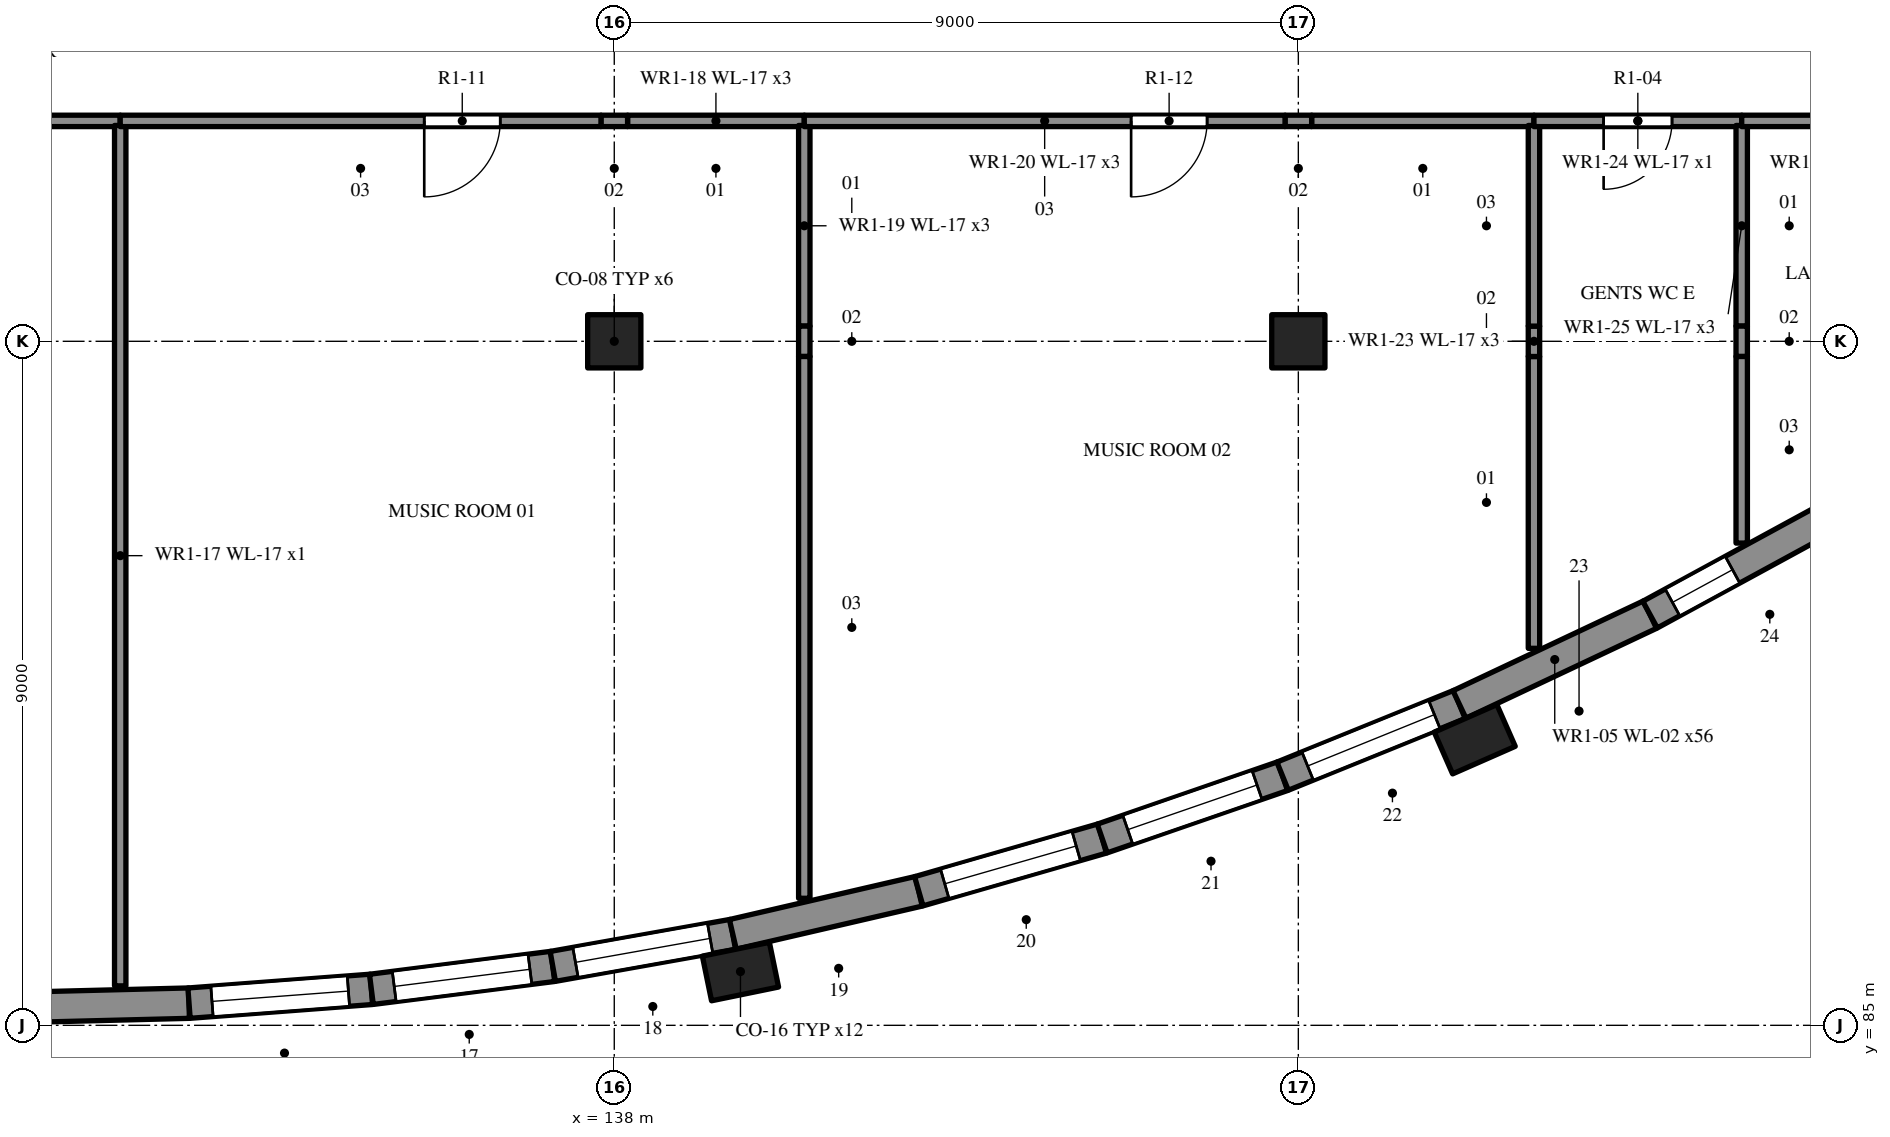
"""IFC4 building model, lengths in metres.
Left out: names, types, materials, properties, quantities, classifications, styles, units other than length and angle.
Written with IfcOpenShell. Run it as: python <this file> out.ifc"""

import sys

from ifc_helpers import new_model, si_unit, direction, frame, frame_2d, origin, origin_2d, place, context, subcontext, project, spatial, rectangle, extrude, element, fill, save


model = new_model("IFC4")
c1 = context("Model", 3, precision=1e-05, world=origin(), true_north=direction((0.0, 1.0)))
c2 = subcontext(c1, "Body", "Model", "MODEL_VIEW")
j1 = project(units=[si_unit("LENGTHUNIT", "METRE"), si_unit("PLANEANGLEUNIT", "RADIAN")], contexts=[c1])
p1 = place(None, origin())
s1 = spatial("IfcSite", under=j1, at=p1, CompositionType="ELEMENT")
p2 = place(p1, origin())
s2 = spatial("IfcBuilding", under=s1, at=p2, CompositionType="ELEMENT")
p3 = place(p2, frame((0.0, 0.0, 5.4)))
s3 = spatial("IfcBuildingStorey", under=s2, at=p3, CompositionType="ELEMENT", Elevation=5.4)
for number, where, z_axis, x_axis in (
    (1, (138.0, 94.0, 0.0), (0.0, 0.0, 1.0), (1.0, 0.0, 0.0)),
    (2, (147.0, 94.0, 0.0), (0.0, 0.0, 1.0), (1.0, 0.0, 0.0)),
):
    element("IfcColumn", number, at=place(p3, frame(where, z_axis=z_axis, x_axis=x_axis)), inside=s3, PredefinedType="COLUMN", context=c2, shape_type="SweptSolid", body=[
        extrude(rectangle(XDim=0.7, YDim=0.7, at=origin_2d()), origin(), (0.0, 0.0, 1.0), 4.52),
    ])
p4 = place(p3, frame((130.0, 85.231, 0.0), z_axis=(0.0, 0.0, 1.0), x_axis=(0.999683321759, 0.025164582196, 0.0)))
e3 = element("IfcWall", 3, at=p4, inside=s3, PredefinedType="SOLIDWALL", context=c2, shape_type="SweptSolid", body=[
    extrude(rectangle(XDim=2.406, YDim=0.4, at=frame_2d((1.203, 0.0))), origin(), (0.0, 0.0, 1.0), 4.8),
])
p5 = place(p3, frame((132.405, 85.292, 0.0), z_axis=(0.0, 0.0, 1.0), x_axis=(0.997146276918, 0.075493724435, 0.0)))
e4 = element("IfcWall", 4, at=p5, inside=s3, PredefinedType="SOLIDWALL", context=c2, shape_type="SweptSolid", body=[
    extrude(rectangle(XDim=2.406, YDim=0.4, at=frame_2d((1.203, 0.0))), origin(), (0.0, 0.0, 1.0), 4.8),
])
p6 = place(p5, frame((0.303, 0.0, 1.0)))
e5 = element("IfcOpeningElement", 5, at=p6, cuts=e4, PredefinedType="OPENING", context=c2, shape_type="SweptSolid", body=[
    extrude(rectangle(XDim=1.8, YDim=2.1, at=frame_2d((0.9, 1.05))), frame((0.0, 0.21, 0.0), z_axis=(0.0, -1.0, 0.0), x_axis=(1.0, 0.0, 0.0)), (0.0, 0.0, 1.0), 0.42),
])
p7 = place(p3, frame((134.804, 85.473, 0.0), z_axis=(0.0, 0.0, 1.0), x_axis=(0.99208939311, 0.125533406227, 0.0)))
e6 = element("IfcWall", 6, at=p7, inside=s3, PredefinedType="SOLIDWALL", context=c2, shape_type="SweptSolid", body=[
    extrude(rectangle(XDim=2.406, YDim=0.4, at=frame_2d((1.203, 0.0))), origin(), (0.0, 0.0, 1.0), 4.8),
])
p8 = place(p7, frame((0.303, 0.0, 1.0)))
e7 = element("IfcOpeningElement", 7, at=p8, cuts=e6, PredefinedType="OPENING", context=c2, shape_type="SweptSolid", body=[
    extrude(rectangle(XDim=1.8, YDim=2.1, at=frame_2d((0.9, 1.05))), frame((0.0, 0.21, 0.0), z_axis=(0.0, -1.0, 0.0), x_axis=(1.0, 0.0, 0.0)), (0.0, 0.0, 1.0), 0.42),
])
p9 = place(p3, frame((137.191, 85.775, 0.0), z_axis=(0.0, 0.0, 1.0), x_axis=(0.984524011381, 0.175249738987, 0.0)))
e8 = element("IfcWall", 8, at=p9, inside=s3, PredefinedType="SOLIDWALL", context=c2, shape_type="SweptSolid", body=[
    extrude(rectangle(XDim=2.406, YDim=0.4, at=frame_2d((1.203, 0.0))), origin(), (0.0, 0.0, 1.0), 4.8),
])
p10 = place(p9, frame((0.303, 0.0, 1.0)))
e9 = element("IfcOpeningElement", 9, at=p10, cuts=e8, PredefinedType="OPENING", context=c2, shape_type="SweptSolid", body=[
    extrude(rectangle(XDim=1.8, YDim=2.1, at=frame_2d((0.9, 1.05))), frame((0.0, 0.21, 0.0), z_axis=(0.0, -1.0, 0.0), x_axis=(1.0, 0.0, 0.0)), (0.0, 0.0, 1.0), 0.42),
])
p11 = place(p3, frame((139.56, 86.197, 0.0), z_axis=(0.0, 0.0, 1.0), x_axis=(0.974210649093, 0.225640446716, 0.0)))
e10 = element("IfcWall", 10, at=p11, inside=s3, PredefinedType="SOLIDWALL", context=c2, shape_type="SweptSolid", body=[
    extrude(rectangle(XDim=2.511, YDim=0.4, at=frame_2d((1.256, 0.0))), origin(), (0.0, 0.0, 1.0), 4.8),
])
p12 = place(p3, frame((142.006, 86.764, 0.0), z_axis=(0.0, 0.0, 1.0), x_axis=(0.961008605775, 0.276518461637, 0.0)))
e11 = element("IfcWall", 11, at=p12, inside=s3, PredefinedType="SOLIDWALL", context=c2, shape_type="SweptSolid", body=[
    extrude(rectangle(XDim=2.511, YDim=0.4, at=frame_2d((1.255, 0.0))), origin(), (0.0, 0.0, 1.0), 4.8),
])
p13 = place(p12, frame((0.355, 0.0, 1.0)))
e12 = element("IfcOpeningElement", 12, at=p13, cuts=e11, PredefinedType="OPENING", context=c2, shape_type="SweptSolid", body=[
    extrude(rectangle(XDim=1.8, YDim=2.1, at=frame_2d((0.9, 1.05))), frame((0.0, 0.21, 0.0), z_axis=(0.0, -1.0, 0.0), x_axis=(1.0, 0.0, 0.0)), (0.0, 0.0, 1.0), 0.42),
])
p14 = place(p3, frame((144.419, 87.458, 0.0), z_axis=(0.0, 0.0, 1.0), x_axis=(0.94514546406, 0.326649738659, 0.0)))
e13 = element("IfcWall", 13, at=p14, inside=s3, PredefinedType="SOLIDWALL", context=c2, shape_type="SweptSolid", body=[
    extrude(rectangle(XDim=2.511, YDim=0.4, at=frame_2d((1.256, 0.0))), origin(), (0.0, 0.0, 1.0), 4.8),
])
p15 = place(p14, frame((0.355, 0.0, 1.0)))
e14 = element("IfcOpeningElement", 14, at=p15, cuts=e13, PredefinedType="OPENING", context=c2, shape_type="SweptSolid", body=[
    extrude(rectangle(XDim=1.8, YDim=2.1, at=frame_2d((0.9, 1.05))), frame((0.0, 0.21, 0.0), z_axis=(0.0, -1.0, 0.0), x_axis=(1.0, 0.0, 0.0)), (0.0, 0.0, 1.0), 0.42),
])
p16 = place(p3, frame((146.793, 88.278, 0.0), z_axis=(0.0, 0.0, 1.0), x_axis=(0.926722795862, 0.375745738007, 0.0)))
e15 = element("IfcWall", 15, at=p16, inside=s3, PredefinedType="SOLIDWALL", context=c2, shape_type="SweptSolid", body=[
    extrude(rectangle(XDim=2.511, YDim=0.4, at=frame_2d((1.255, 0.0))), origin(), (0.0, 0.0, 1.0), 4.8),
])
p17 = place(p16, frame((0.355, 0.0, 1.0)))
e16 = element("IfcOpeningElement", 16, at=p17, cuts=e15, PredefinedType="OPENING", context=c2, shape_type="SweptSolid", body=[
    extrude(rectangle(XDim=1.8, YDim=2.1, at=frame_2d((0.9, 1.05))), frame((0.0, 0.21, 0.0), z_axis=(0.0, -1.0, 0.0), x_axis=(1.0, 0.0, 0.0)), (0.0, 0.0, 1.0), 0.42),
])
p18 = place(p3, frame((149.12, 89.222, 0.0), z_axis=(0.0, 0.0, 1.0), x_axis=(0.904527098751, 0.42641614372, 0.0)))
e17 = element("IfcWall", 17, at=p18, inside=s3, PredefinedType="SOLIDWALL", context=c2, shape_type="SweptSolid", body=[
    extrude(rectangle(XDim=2.772, YDim=0.4, at=frame_2d((1.386, 0.0))), origin(), (0.0, 0.0, 1.0), 4.8),
])
p19 = place(p3, frame((151.627, 90.404, 0.0), z_axis=(0.0, 0.0, 1.0), x_axis=(0.878292493566, 0.478123724308, 0.0)))
e18 = element("IfcWall", 18, at=p19, inside=s3, PredefinedType="SOLIDWALL", context=c2, shape_type="SweptSolid", body=[
    extrude(rectangle(XDim=2.772, YDim=0.4, at=frame_2d((1.386, 0.0))), origin(), (0.0, 0.0, 1.0), 4.8),
])
p20 = place(p19, frame((0.336, 0.0, 1.6)))
e19 = element("IfcOpeningElement", 19, at=p20, cuts=e18, PredefinedType="OPENING", context=c2, shape_type="SweptSolid", body=[
    extrude(rectangle(XDim=0.9, YDim=0.6, at=frame_2d((0.45, 0.3))), frame((0.0, 0.21, 0.0), z_axis=(0.0, -1.0, 0.0), x_axis=(1.0, 0.0, 0.0)), (0.0, 0.0, 1.0), 0.42),
])
for number, where, z_axis, x_axis in (
    (20, (139.66, 85.707, 0.0), (0.0, 0.0, 1.0), (0.98, 0.201, 0.0)),
    (21, (149.321, 88.764, 0.0), (0.0, 0.0, 1.0), (0.915, 0.403, 0.0)),
):
    element("IfcColumn", number, at=place(p3, frame(where, z_axis=z_axis, x_axis=x_axis)), inside=s3, PredefinedType="PILASTER", context=c2, shape_type="SweptSolid", body=[
        extrude(rectangle(XDim=0.9, YDim=0.6, at=origin_2d()), origin(), (0.0, 0.0, 1.0), 4.8),
    ])
p21 = place(p3, frame((131.5, 96.9, 0.0), z_axis=(0.0, 0.0, 1.0), x_axis=(-1.0, 0.0, 0.0)))
e22 = element("IfcWall", 22, at=p21, inside=s3, PredefinedType="PARTITIONING", context=c2, shape_type="SweptSolid", body=[
    extrude(rectangle(XDim=21.6, YDim=0.15, at=frame_2d((10.8, 0.0))), origin(), (0.0, 0.0, 1.0), 4.52),
])
p22 = place(p21, frame((15.3, 0.0, 0.0)))
e23 = element("IfcOpeningElement", 23, at=p22, cuts=e22, PredefinedType="OPENING", context=c2, shape_type="SweptSolid", body=[
    extrude(rectangle(XDim=1.8, YDim=2.1, at=frame_2d((0.9, 1.05))), frame((0.0, 0.085, 0.0), z_axis=(0.0, -1.0, 0.0), x_axis=(1.0, 0.0, 0.0)), (0.0, 0.0, 1.0), 0.17),
])
p23 = place(p21, frame((4.5, 0.0, 0.0)))
e24 = element("IfcOpeningElement", 24, at=p23, cuts=e22, PredefinedType="OPENING", context=c2, shape_type="SweptSolid", body=[
    extrude(rectangle(XDim=1.8, YDim=2.1, at=frame_2d((0.9, 1.05))), frame((0.0, 0.085, 0.0), z_axis=(0.0, -1.0, 0.0), x_axis=(1.0, 0.0, 0.0)), (0.0, 0.0, 1.0), 0.17),
])
p24 = place(p3, frame((131.5, 96.84, 0.0), z_axis=(0.0, 0.0, 1.0), x_axis=(0.0, -1.0, 0.0)))
e25 = element("IfcWall", 25, at=p24, inside=s3, PredefinedType="PARTITIONING", context=c2, shape_type="SweptSolid", body=[
    extrude(rectangle(XDim=11.321, YDim=0.15, at=frame_2d((5.661, 0.0))), origin(), (0.0, 0.0, 1.0), 4.52),
])
p25 = place(p3, frame((140.5, 96.9, 0.0), z_axis=(0.0, 0.0, 1.0), x_axis=(-1.0, 0.0, 0.0)))
e26 = element("IfcWall", 26, at=p25, inside=s3, PredefinedType="PARTITIONING", context=c2, shape_type="SweptSolid", body=[
    extrude(rectangle(XDim=2.325, YDim=0.15, at=frame_2d((1.163, 0.0))), origin(), (0.0, 0.0, 1.0), 4.52),
])
p26 = place(p3, frame((138.175, 96.9, 0.0), z_axis=(0.0, 0.0, 1.0), x_axis=(-1.0, 0.0, 0.0)))
e27 = element("IfcWall", 27, at=p26, inside=s3, PredefinedType="PARTITIONING", context=c2, shape_type="SweptSolid", body=[
    extrude(rectangle(XDim=0.35, YDim=0.15, at=frame_2d((0.175, 0.0))), origin(), (0.0, 0.0, 1.0), 3.82),
])
p27 = place(p3, frame((137.825, 96.9, 0.0), z_axis=(0.0, 0.0, 1.0), x_axis=(-1.0, 0.0, 0.0)))
e28 = element("IfcWall", 28, at=p27, inside=s3, PredefinedType="PARTITIONING", context=c2, shape_type="SweptSolid", body=[
    extrude(rectangle(XDim=6.325, YDim=0.15, at=frame_2d((3.163, 0.0))), origin(), (0.0, 0.0, 1.0), 4.52),
])
p28 = place(p27, frame((1.325, 0.0, 0.0)))
e29 = element("IfcOpeningElement", 29, at=p28, cuts=e28, PredefinedType="OPENING", context=c2, shape_type="SweptSolid", body=[
    extrude(rectangle(XDim=1.0, YDim=2.1, at=frame_2d((0.5, 1.05))), frame((0.0, 0.085, 0.0), z_axis=(0.0, -1.0, 0.0), x_axis=(1.0, 0.0, 0.0)), (0.0, 0.0, 1.0), 0.17),
])
p29 = place(p3, frame((140.5, 96.84, 0.0), z_axis=(0.0, 0.0, 1.0), x_axis=(0.0, -1.0, 0.0)))
e30 = element("IfcWall", 30, at=p29, inside=s3, PredefinedType="PARTITIONING", context=c2, shape_type="SweptSolid", body=[
    extrude(rectangle(XDim=2.64, YDim=0.15, at=frame_2d((1.32, 0.0))), origin(), (0.0, 0.0, 1.0), 4.52),
])
p30 = place(p3, frame((140.5, 94.2, 0.0), z_axis=(0.0, 0.0, 1.0), x_axis=(0.0, -1.0, 0.0)))
e31 = element("IfcWall", 31, at=p30, inside=s3, PredefinedType="PARTITIONING", context=c2, shape_type="SweptSolid", body=[
    extrude(rectangle(XDim=0.4, YDim=0.15, at=frame_2d((0.2, 0.0))), origin(), (0.0, 0.0, 1.0), 3.72),
])
p31 = place(p3, frame((140.5, 93.8, 0.0), z_axis=(0.0, 0.0, 1.0), x_axis=(0.0, -1.0, 0.0)))
e32 = element("IfcWall", 32, at=p31, inside=s3, PredefinedType="PARTITIONING", context=c2, shape_type="SweptSolid", body=[
    extrude(rectangle(XDim=7.129, YDim=0.15, at=frame_2d((3.564, 0.0))), origin(), (0.0, 0.0, 1.0), 4.52),
])
p32 = place(p3, frame((150.1, 96.9, 0.0), z_axis=(0.0, 0.0, 1.0), x_axis=(-1.0, 0.0, 0.0)))
e33 = element("IfcWall", 33, at=p32, inside=s3, PredefinedType="PARTITIONING", context=c2, shape_type="SweptSolid", body=[
    extrude(rectangle(XDim=2.925, YDim=0.15, at=frame_2d((1.462, 0.0))), origin(), (0.0, 0.0, 1.0), 4.52),
])
p33 = place(p3, frame((147.175, 96.9, 0.0), z_axis=(0.0, 0.0, 1.0), x_axis=(-1.0, 0.0, 0.0)))
e34 = element("IfcWall", 34, at=p33, inside=s3, PredefinedType="PARTITIONING", context=c2, shape_type="SweptSolid", body=[
    extrude(rectangle(XDim=0.35, YDim=0.15, at=frame_2d((0.175, 0.0))), origin(), (0.0, 0.0, 1.0), 3.82),
])
p34 = place(p3, frame((146.825, 96.9, 0.0), z_axis=(0.0, 0.0, 1.0), x_axis=(-1.0, 0.0, 0.0)))
e35 = element("IfcWall", 35, at=p34, inside=s3, PredefinedType="PARTITIONING", context=c2, shape_type="SweptSolid", body=[
    extrude(rectangle(XDim=6.325, YDim=0.15, at=frame_2d((3.163, 0.0))), origin(), (0.0, 0.0, 1.0), 4.52),
])
p35 = place(p34, frame((1.025, 0.0, 0.0)))
e36 = element("IfcOpeningElement", 36, at=p35, cuts=e35, PredefinedType="OPENING", context=c2, shape_type="SweptSolid", body=[
    extrude(rectangle(XDim=1.0, YDim=2.1, at=frame_2d((0.5, 1.05))), frame((0.0, 0.085, 0.0), z_axis=(0.0, -1.0, 0.0), x_axis=(1.0, 0.0, 0.0)), (0.0, 0.0, 1.0), 0.17),
])
p36 = place(p3, frame((150.1, 89.96, 0.0), z_axis=(0.0, 0.0, 1.0), x_axis=(0.0, 1.0, 0.0)))
e37 = element("IfcWall", 37, at=p36, inside=s3, PredefinedType="PARTITIONING", context=c2, shape_type="SweptSolid", body=[
    extrude(rectangle(XDim=3.84, YDim=0.15, at=frame_2d((1.92, 0.0))), origin(), (0.0, 0.0, 1.0), 4.52),
])
p37 = place(p3, frame((150.1, 93.8, 0.0), z_axis=(0.0, 0.0, 1.0), x_axis=(0.0, 1.0, 0.0)))
e38 = element("IfcWall", 38, at=p37, inside=s3, PredefinedType="PARTITIONING", context=c2, shape_type="SweptSolid", body=[
    extrude(rectangle(XDim=0.4, YDim=0.15, at=frame_2d((0.2, 0.0))), origin(), (0.0, 0.0, 1.0), 3.72),
])
p38 = place(p3, frame((150.1, 94.2, 0.0), z_axis=(0.0, 0.0, 1.0), x_axis=(0.0, 1.0, 0.0)))
e39 = element("IfcWall", 39, at=p38, inside=s3, PredefinedType="PARTITIONING", context=c2, shape_type="SweptSolid", body=[
    extrude(rectangle(XDim=2.64, YDim=0.15, at=frame_2d((1.32, 0.0))), origin(), (0.0, 0.0, 1.0), 4.52),
])
p39 = place(p3, frame((152.833, 96.9, 0.0), z_axis=(0.0, 0.0, 1.0), x_axis=(-1.0, 0.0, 0.0)))
e40 = element("IfcWall", 40, at=p39, inside=s3, PredefinedType="PARTITIONING", context=c2, shape_type="SweptSolid", body=[
    extrude(rectangle(XDim=2.733, YDim=0.15, at=frame_2d((1.367, 0.0))), origin(), (0.0, 0.0, 1.0), 4.52),
])
p40 = place(p39, frame((0.917, 0.0, 0.0)))
e41 = element("IfcOpeningElement", 41, at=p40, cuts=e40, PredefinedType="OPENING", context=c2, shape_type="SweptSolid", body=[
    extrude(rectangle(XDim=0.9, YDim=2.1, at=frame_2d((0.45, 1.05))), frame((0.0, 0.085, 0.0), z_axis=(0.0, -1.0, 0.0), x_axis=(1.0, 0.0, 0.0)), (0.0, 0.0, 1.0), 0.17),
])
p41 = place(p3, frame((152.833, 96.84, 0.0), z_axis=(0.0, 0.0, 1.0), x_axis=(0.0, -1.0, 0.0)))
e42 = element("IfcWall", 42, at=p41, inside=s3, PredefinedType="PARTITIONING", context=c2, shape_type="SweptSolid", body=[
    extrude(rectangle(XDim=2.64, YDim=0.15, at=frame_2d((1.32, 0.0))), origin(), (0.0, 0.0, 1.0), 4.52),
])
p42 = place(p3, frame((152.833, 94.2, 0.0), z_axis=(0.0, 0.0, 1.0), x_axis=(0.0, -1.0, 0.0)))
e43 = element("IfcWall", 43, at=p42, inside=s3, PredefinedType="PARTITIONING", context=c2, shape_type="SweptSolid", body=[
    extrude(rectangle(XDim=0.4, YDim=0.15, at=frame_2d((0.2, 0.0))), origin(), (0.0, 0.0, 1.0), 3.72),
])
p43 = place(p3, frame((152.833, 93.8, 0.0), z_axis=(0.0, 0.0, 1.0), x_axis=(0.0, -1.0, 0.0)))
e44 = element("IfcWall", 44, at=p43, inside=s3, PredefinedType="PARTITIONING", context=c2, shape_type="SweptSolid", body=[
    extrude(rectangle(XDim=2.455, YDim=0.15, at=frame_2d((1.228, 0.0))), origin(), (0.0, 0.0, 1.0), 4.52),
])
p44 = place(p3, frame((155.567, 96.9, 0.0), z_axis=(0.0, 0.0, 1.0), x_axis=(-1.0, 0.0, 0.0)))
e45 = element("IfcWall", 45, at=p44, inside=s3, PredefinedType="PARTITIONING", context=c2, shape_type="SweptSolid", body=[
    extrude(rectangle(XDim=2.733, YDim=0.15, at=frame_2d((1.367, 0.0))), origin(), (0.0, 0.0, 1.0), 4.52),
])
p45 = place(p44, frame((0.917, 0.0, 0.0)))
e46 = element("IfcOpeningElement", 46, at=p45, cuts=e45, PredefinedType="OPENING", context=c2, shape_type="SweptSolid", body=[
    extrude(rectangle(XDim=0.9, YDim=2.1, at=frame_2d((0.45, 1.05))), frame((0.0, 0.085, 0.0), z_axis=(0.0, -1.0, 0.0), x_axis=(1.0, 0.0, 0.0)), (0.0, 0.0, 1.0), 0.17),
])
p46 = place(p6, origin())
e47 = element("IfcWindow", 47, at=p46, inside=s3, PartitioningType="SINGLE_PANEL", PredefinedType="WINDOW", context=c2, shape_type="SweptSolid", body=[
    extrude(rectangle(XDim=1.8, YDim=2.1, at=frame_2d((0.9, 1.05))), frame((0.0, 0.03, 0.0), z_axis=(0.0, -1.0, 0.0), x_axis=(1.0, 0.0, 0.0)), (0.0, 0.0, 1.0), 0.06),
])
fill(e5, e47)
p47 = place(p8, origin())
e48 = element("IfcWindow", 48, at=p47, inside=s3, PartitioningType="SINGLE_PANEL", PredefinedType="WINDOW", context=c2, shape_type="SweptSolid", body=[
    extrude(rectangle(XDim=1.8, YDim=2.1, at=frame_2d((0.9, 1.05))), frame((0.0, 0.03, 0.0), z_axis=(0.0, -1.0, 0.0), x_axis=(1.0, 0.0, 0.0)), (0.0, 0.0, 1.0), 0.06),
])
fill(e7, e48)
p48 = place(p10, origin())
e49 = element("IfcWindow", 49, at=p48, inside=s3, PartitioningType="SINGLE_PANEL", PredefinedType="WINDOW", context=c2, shape_type="SweptSolid", body=[
    extrude(rectangle(XDim=1.8, YDim=2.1, at=frame_2d((0.9, 1.05))), frame((0.0, 0.03, 0.0), z_axis=(0.0, -1.0, 0.0), x_axis=(1.0, 0.0, 0.0)), (0.0, 0.0, 1.0), 0.06),
])
fill(e9, e49)
p49 = place(p13, origin())
e50 = element("IfcWindow", 50, at=p49, inside=s3, PartitioningType="SINGLE_PANEL", PredefinedType="WINDOW", context=c2, shape_type="SweptSolid", body=[
    extrude(rectangle(XDim=1.8, YDim=2.1, at=frame_2d((0.9, 1.05))), frame((0.0, 0.03, 0.0), z_axis=(0.0, -1.0, 0.0), x_axis=(1.0, 0.0, 0.0)), (0.0, 0.0, 1.0), 0.06),
])
fill(e12, e50)
p50 = place(p15, origin())
e51 = element("IfcWindow", 51, at=p50, inside=s3, PartitioningType="SINGLE_PANEL", PredefinedType="WINDOW", context=c2, shape_type="SweptSolid", body=[
    extrude(rectangle(XDim=1.8, YDim=2.1, at=frame_2d((0.9, 1.05))), frame((0.0, 0.03, 0.0), z_axis=(0.0, -1.0, 0.0), x_axis=(1.0, 0.0, 0.0)), (0.0, 0.0, 1.0), 0.06),
])
fill(e14, e51)
p51 = place(p17, origin())
e52 = element("IfcWindow", 52, at=p51, inside=s3, PartitioningType="SINGLE_PANEL", PredefinedType="WINDOW", context=c2, shape_type="SweptSolid", body=[
    extrude(rectangle(XDim=1.8, YDim=2.1, at=frame_2d((0.9, 1.05))), frame((0.0, 0.03, 0.0), z_axis=(0.0, -1.0, 0.0), x_axis=(1.0, 0.0, 0.0)), (0.0, 0.0, 1.0), 0.06),
])
fill(e16, e52)
p52 = place(p20, origin())
e53 = element("IfcWindow", 53, at=p52, inside=s3, PartitioningType="SINGLE_PANEL", PredefinedType="WINDOW", context=c2, shape_type="SweptSolid", body=[
    extrude(rectangle(XDim=0.9, YDim=0.6, at=frame_2d((0.45, 0.3))), frame((0.0, 0.03, 0.0), z_axis=(0.0, -1.0, 0.0), x_axis=(1.0, 0.0, 0.0)), (0.0, 0.0, 1.0), 0.06),
])
fill(e19, e53)
p53 = place(p40, origin())
e54 = element("IfcDoor", 54, at=p53, inside=s3, OperationType="SINGLE_SWING_RIGHT", PredefinedType="DOOR", context=c2, shape_type="SweptSolid", body=[
    extrude(rectangle(XDim=0.9, YDim=2.1, at=frame_2d((0.45, 1.05))), frame((0.0, 0.025, 0.0), z_axis=(0.0, -1.0, 0.0), x_axis=(1.0, 0.0, 0.0)), (0.0, 0.0, 1.0), 0.05),
])
fill(e41, e54)
p54 = place(p28, origin())
e55 = element("IfcDoor", 55, at=p54, inside=s3, OperationType="SINGLE_SWING_RIGHT", PredefinedType="DOOR", context=c2, shape_type="SweptSolid", body=[
    extrude(rectangle(XDim=1.0, YDim=2.1, at=frame_2d((0.5, 1.05))), frame((0.0, 0.025, 0.0), z_axis=(0.0, -1.0, 0.0), x_axis=(1.0, 0.0, 0.0)), (0.0, 0.0, 1.0), 0.05),
])
fill(e29, e55)
p55 = place(p35, origin())
e56 = element("IfcDoor", 56, at=p55, inside=s3, OperationType="SINGLE_SWING_RIGHT", PredefinedType="DOOR", context=c2, shape_type="SweptSolid", body=[
    extrude(rectangle(XDim=1.0, YDim=2.1, at=frame_2d((0.5, 1.05))), frame((0.0, 0.025, 0.0), z_axis=(0.0, -1.0, 0.0), x_axis=(1.0, 0.0, 0.0)), (0.0, 0.0, 1.0), 0.05),
])
fill(e36, e56)
save(model, sys.argv[1])
